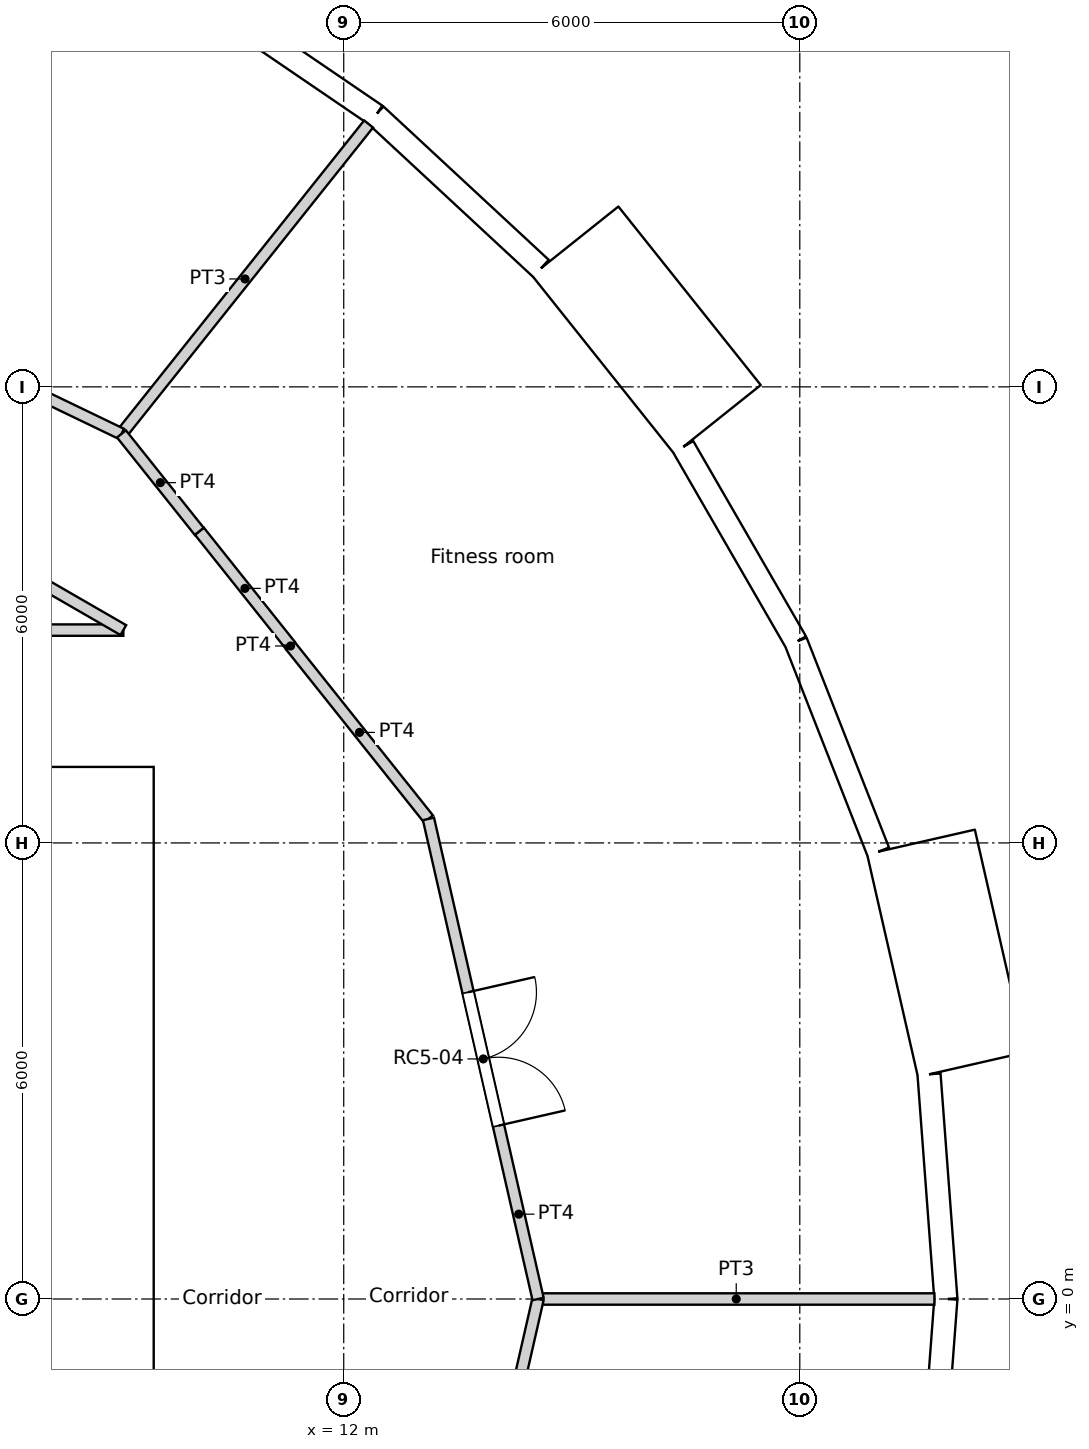
"""IFC4 building model, lengths in metres.
Left out: names, types, materials, properties, quantities, classifications, styles, units other than length and angle.
Written with IfcOpenShell. Run it as: python <this file> out.ifc"""

import sys

from ifc_helpers import new_model, si_unit, direction, frame, frame_2d, origin, origin_2d, place, context, subcontext, project, spatial, rectangle, circle, extrude, element, fill, save


model = new_model("IFC4")
c1 = context("Model", 3, precision=1e-05, world=origin(), true_north=direction((0.0, 1.0)))
c2 = subcontext(c1, "Body", "Model", "MODEL_VIEW")
j1 = project(units=[si_unit("LENGTHUNIT", "METRE"), si_unit("PLANEANGLEUNIT", "RADIAN")], contexts=[c1])
p1 = place(None, origin())
s1 = spatial("IfcSite", under=j1, at=p1, CompositionType="ELEMENT")
p2 = place(p1, origin())
s2 = spatial("IfcBuilding", under=s1, at=p2, CompositionType="ELEMENT")
p3 = place(p2, frame((0.0, 0.0, 270.6)))
s3 = spatial("IfcBuildingStorey", under=s2, at=p3, CompositionType="ELEMENT", Elevation=270.6)
for number, where, z_axis, x_axis in (
    (1, (18.822, 0.0, 0.0), (0.0, 0.0, 1.0), (1.0, 0.0, 0.0)),
    (2, (17.986, 5.548, 0.0), (0.0, 0.0, 1.0), (1.0, 0.0, 0.0)),
    (3, (15.552, 10.603, 0.0), (0.0, 0.0, 1.0), (1.0, 0.0, 0.0)),
    (4, (11.735, 14.716, 0.0), (0.0, 0.0, 1.0), (1.0, 0.0, 0.0)),
):
    element("IfcColumn", number, at=place(p3, frame(where, z_axis=z_axis, x_axis=x_axis)), inside=s3, PredefinedType="COLUMN", context=c2, shape_type="SweptSolid", body=[
        extrude(circle(Radius=0.55, at=origin_2d()), origin(), (0.0, 0.0, 1.0), 3.6),
    ])
p4 = place(p3, frame((19.922, 0.0, 0.0), z_axis=(0.0, 0.0, 1.0), x_axis=(-0.074755115547, 0.997201921729, 0.0)))
e5 = element("IfcWall", 5, at=p4, inside=s3, PredefinedType="SOLIDWALL", context=c2, shape_type="SweptSolid", body=[
    extrude(rectangle(XDim=2.962, YDim=0.3, at=frame_2d((1.481, 0.0))), origin(), (0.0, 0.0, 1.0), 3.25),
])
p5 = place(p4, frame((1.481, 0.0, 1.55)))
e6 = element("IfcOpeningElement", 6, at=p5, cuts=e5, PredefinedType="OPENING", context=c2, shape_type="SweptSolid", body=[
    extrude(circle(Radius=0.9, at=origin_2d()), frame((0.0, 0.16, 0.0), z_axis=(0.0, -1.0, 0.0), x_axis=(1.0, 0.0, 0.0)), (0.0, 0.0, 1.0), 0.32),
])
p6 = place(p3, frame((20.262, 3.086, -0.35), z_axis=(0.0, 0.0, 1.0), x_axis=(-0.222570682856, 0.974916555985, 0.0)))
e7 = element("IfcWall", 7, at=p6, inside=s3, PredefinedType="ELEMENTEDWALL", context=c2, shape_type="SweptSolid", body=[
    extrude(rectangle(XDim=3.0, YDim=1.45, at=frame_2d((1.5, 0.0))), origin(), (0.0, 0.0, 1.0), 3.6),
])
p7 = place(p6, frame((1.5, 0.0, 1.9)))
e8 = element("IfcOpeningElement", 8, at=p7, cuts=e7, PredefinedType="OPENING", context=c2, shape_type="SweptSolid", body=[
    extrude(circle(Radius=0.9, at=origin_2d()), frame((0.0, 0.735, 0.0), z_axis=(0.0, -1.0, 0.0), x_axis=(1.0, 0.0, 0.0)), (0.0, 0.0, 1.0), 1.47),
])
p8 = place(p3, frame((19.031, 5.886, 0.0), z_axis=(0.0, 0.0, 1.0), x_axis=(-0.365343821297, 0.930872650925, 0.0)))
e9 = element("IfcWall", 9, at=p8, inside=s3, PredefinedType="SOLIDWALL", context=c2, shape_type="SweptSolid", body=[
    extrude(rectangle(XDim=2.962, YDim=0.3, at=frame_2d((1.481, 0.0))), origin(), (0.0, 0.0, 1.0), 3.25),
])
p9 = place(p8, frame((1.481, 0.0, 1.55)))
e10 = element("IfcOpeningElement", 10, at=p9, cuts=e9, PredefinedType="OPENING", context=c2, shape_type="SweptSolid", body=[
    extrude(circle(Radius=0.9, at=origin_2d()), frame((0.0, 0.16, 0.0), z_axis=(0.0, -1.0, 0.0), x_axis=(1.0, 0.0, 0.0)), (0.0, 0.0, 1.0), 0.32),
])
p10 = place(p3, frame((17.949, 8.644, 0.0), z_axis=(0.0, 0.0, 1.0), x_axis=(-0.500012570604, 0.866018146021, 0.0)))
e11 = element("IfcWall", 11, at=p10, inside=s3, PredefinedType="SOLIDWALL", context=c2, shape_type="SweptSolid", body=[
    extrude(rectangle(XDim=2.962, YDim=0.3, at=frame_2d((1.481, 0.0))), origin(), (0.0, 0.0, 1.0), 3.25),
])
p11 = place(p10, frame((1.481, 0.0, 1.55)))
e12 = element("IfcOpeningElement", 12, at=p11, cuts=e11, PredefinedType="OPENING", context=c2, shape_type="SweptSolid", body=[
    extrude(circle(Radius=0.9, at=origin_2d()), frame((0.0, 0.16, 0.0), z_axis=(0.0, -1.0, 0.0), x_axis=(1.0, 0.0, 0.0)), (0.0, 0.0, 1.0), 0.32),
])
p12 = place(p3, frame((16.917, 11.572, -0.35), z_axis=(0.0, 0.0, 1.0), x_axis=(-0.623523286312, 0.781804778335, 0.0)))
e13 = element("IfcWall", 13, at=p12, inside=s3, PredefinedType="ELEMENTEDWALL", context=c2, shape_type="SweptSolid", body=[
    extrude(rectangle(XDim=3.0, YDim=1.45, at=frame_2d((1.5, 0.0))), origin(), (0.0, 0.0, 1.0), 3.6),
])
p13 = place(p12, frame((1.5, 0.0, 1.9)))
e14 = element("IfcOpeningElement", 14, at=p13, cuts=e13, PredefinedType="OPENING", context=c2, shape_type="SweptSolid", body=[
    extrude(circle(Radius=0.9, at=origin_2d()), frame((0.0, 0.735, 0.0), z_axis=(0.0, -1.0, 0.0), x_axis=(1.0, 0.0, 0.0)), (0.0, 0.0, 1.0), 1.47),
])
p14 = place(p3, frame((14.593, 13.561, 0.0), z_axis=(0.0, 0.0, 1.0), x_axis=(-0.733028283666, 0.680198158882, 0.0)))
e15 = element("IfcWall", 15, at=p14, inside=s3, PredefinedType="SOLIDWALL", context=c2, shape_type="SweptSolid", body=[
    extrude(rectangle(XDim=2.962, YDim=0.3, at=frame_2d((1.481, 0.0))), origin(), (0.0, 0.0, 1.0), 3.25),
])
p15 = place(p14, frame((1.481, 0.0, 1.55)))
e16 = element("IfcOpeningElement", 16, at=p15, cuts=e15, PredefinedType="OPENING", context=c2, shape_type="SweptSolid", body=[
    extrude(circle(Radius=0.9, at=origin_2d()), frame((0.0, 0.16, 0.0), z_axis=(0.0, -1.0, 0.0), x_axis=(1.0, 0.0, 0.0)), (0.0, 0.0, 1.0), 0.32),
])
p16 = place(p3, frame((12.421, 15.575, 0.0), z_axis=(0.0, 0.0, 1.0), x_axis=(-0.826236061068, 0.563324037646, 0.0)))
e17 = element("IfcWall", 17, at=p16, inside=s3, PredefinedType="SOLIDWALL", context=c2, shape_type="SweptSolid", body=[
    extrude(rectangle(XDim=2.962, YDim=0.3, at=frame_2d((1.481, 0.0))), origin(), (0.0, 0.0, 1.0), 3.25),
])
p17 = place(p16, frame((1.481, 0.0, 1.55)))
e18 = element("IfcOpeningElement", 18, at=p17, cuts=e17, PredefinedType="OPENING", context=c2, shape_type="SweptSolid", body=[
    extrude(circle(Radius=0.9, at=origin_2d()), frame((0.0, 0.16, 0.0), z_axis=(0.0, -1.0, 0.0), x_axis=(1.0, 0.0, 0.0)), (0.0, 0.0, 1.0), 0.32),
])
p18 = place(p3, frame((19.7, -2.954, 0.0), z_axis=(0.0, 0.0, 1.0), x_axis=(0.074755115547, 0.997201921729, 0.0)))
e19 = element("IfcWall", 19, at=p18, inside=s3, PredefinedType="SOLIDWALL", context=c2, shape_type="SweptSolid", body=[
    extrude(rectangle(XDim=2.962, YDim=0.3, at=frame_2d((1.481, 0.0))), origin(), (0.0, 0.0, 1.0), 3.25),
])
p19 = place(p18, frame((1.481, 0.0, 1.55)))
e20 = element("IfcOpeningElement", 20, at=p19, cuts=e19, PredefinedType="OPENING", context=c2, shape_type="SweptSolid", body=[
    extrude(circle(Radius=0.9, at=origin_2d()), frame((0.0, 0.16, 0.0), z_axis=(0.0, -1.0, 0.0), x_axis=(1.0, 0.0, 0.0)), (0.0, 0.0, 1.0), 0.32),
])
p20 = place(p3, frame((-9.5, 6.7, 0.0), z_axis=(0.0, 0.0, 1.0), x_axis=(1.0, 0.0, 0.0)))
e21 = element("IfcWall", 21, at=p20, inside=s3, PredefinedType="SOLIDWALL", context=c2, shape_type="SweptSolid", body=[
    extrude(rectangle(XDim=19.0, YDim=0.6, at=frame_2d((9.5, 0.0))), origin(), (0.0, 0.0, 1.0), 3.6),
])
p21 = place(p20, frame((5.35, 0.0, 0.0)))
e22 = element("IfcOpeningElement", 22, at=p21, cuts=e21, PredefinedType="OPENING", context=c2, shape_type="SweptSolid", body=[
    extrude(rectangle(XDim=1.7, YDim=2.1, at=frame_2d((0.85, 1.05))), frame((0.0, 0.3, 0.0), z_axis=(0.0, -1.0, 0.0), x_axis=(1.0, 0.0, 0.0)), (0.0, 0.0, 1.0), 0.6),
])
p22 = place(p3, frame((9.2, -6.4, 0.0), z_axis=(0.0, 0.0, 1.0), x_axis=(0.0, 1.0, 0.0)))
e23 = element("IfcWall", 23, at=p22, inside=s3, PredefinedType="SOLIDWALL", context=c2, shape_type="SweptSolid", body=[
    extrude(rectangle(XDim=12.8, YDim=0.6, at=frame_2d((6.4, 0.0))), origin(), (0.0, 0.0, 1.0), 3.6),
])
p23 = place(p22, frame((6.4, 0.0, 0.0)))
e24 = element("IfcOpeningElement", 24, at=p23, cuts=e23, PredefinedType="OPENING", context=c2, shape_type="SweptSolid", body=[
    extrude(rectangle(XDim=1.8, YDim=2.1, at=frame_2d((0.9, 1.05))), frame((0.0, 0.3, 0.0), z_axis=(0.0, -1.0, 0.0), x_axis=(1.0, 0.0, 0.0)), (0.0, 0.0, 1.0), 0.6),
])
p24 = place(p3, frame((-4.35, 3.1, 0.0), z_axis=(0.0, 0.0, 1.0), x_axis=(1.0, 0.0, 0.0)))
e25 = element("IfcWall", 25, at=p24, inside=s3, PredefinedType="SOLIDWALL", context=c2, shape_type="SweptSolid", body=[
    extrude(rectangle(XDim=13.25, YDim=0.3, at=frame_2d((6.625, 0.0))), origin(), (0.0, 0.0, 1.0), 3.25),
])
p25 = place(p24, frame((2.95, 0.0, 0.0)))
e26 = element("IfcOpeningElement", 26, at=p25, cuts=e25, PredefinedType="OPENING", context=c2, shape_type="SweptSolid", body=[
    extrude(rectangle(XDim=1.1, YDim=2.1, at=frame_2d((0.55, 1.05))), frame((0.0, 0.15, 0.0), z_axis=(0.0, -1.0, 0.0), x_axis=(1.0, 0.0, 0.0)), (0.0, 0.0, 1.0), 0.3),
])
p26 = place(p24, frame((5.75, 0.0, 0.0)))
e27 = element("IfcOpeningElement", 27, at=p26, cuts=e25, PredefinedType="OPENING", context=c2, shape_type="SweptSolid", body=[
    extrude(rectangle(XDim=1.1, YDim=2.1, at=frame_2d((0.55, 1.05))), frame((0.0, 0.15, 0.0), z_axis=(0.0, -1.0, 0.0), x_axis=(1.0, 0.0, 0.0)), (0.0, 0.0, 1.0), 0.3),
])
p27 = place(p24, frame((8.55, 0.0, 0.0)))
e28 = element("IfcOpeningElement", 28, at=p27, cuts=e25, PredefinedType="OPENING", context=c2, shape_type="SweptSolid", body=[
    extrude(rectangle(XDim=1.1, YDim=2.1, at=frame_2d((0.55, 1.05))), frame((0.0, 0.15, 0.0), z_axis=(0.0, -1.0, 0.0), x_axis=(1.0, 0.0, 0.0)), (0.0, 0.0, 1.0), 0.3),
])
p28 = place(p3, frame((-9.092, 8.8, 0.0), z_axis=(0.0, 0.0, 1.0), x_axis=(1.0, 0.0, 0.0)))
e29 = element("IfcWall", 29, at=p28, inside=s3, PredefinedType="PARTITIONING", context=c2, shape_type="SweptSolid", body=[
    extrude(rectangle(XDim=18.193, YDim=0.15, at=frame_2d((9.096, 0.0))), origin(), (0.0, 0.0, 1.0), 3.1),
])
p29 = place(p28, frame((8.592, 0.0, 0.0)))
e30 = element("IfcOpeningElement", 30, at=p29, cuts=e29, PredefinedType="OPENING", context=c2, shape_type="SweptSolid", body=[
    extrude(rectangle(XDim=1.0, YDim=2.04, at=frame_2d((0.5, 1.02))), frame((0.0, 0.075, 0.0), z_axis=(0.0, -1.0, 0.0), x_axis=(1.0, 0.0, 0.0)), (0.0, 0.0, 1.0), 0.15),
])
p30 = place(p3, frame((10.101, 10.101, 0.0), z_axis=(0.0, 0.0, 1.0), x_axis=(0.623130947784, -0.782117524362, 0.0)))
e31 = element("IfcWall", 31, at=p30, inside=s3, PredefinedType="PARTITIONING", context=c2, shape_type="SweptSolid", body=[
    extrude(rectangle(XDim=1.924, YDim=0.15, at=frame_2d((0.962, 0.0))), origin(), (0.0, 0.0, 1.0), 3.1),
])
p31 = place(p3, frame((11.3, 8.586, 0.0), z_axis=(0.0, 0.0, 1.0), x_axis=(0.0, 1.0, 0.0)))
e32 = element("IfcWall", 32, at=p31, inside=s3, PredefinedType="PARTITIONING", context=c2, shape_type="SweptSolid", body=[
    extrude(rectangle(XDim=0.01, YDim=0.15, at=frame_2d((0.005, 0.0))), origin(), (0.0, 0.0, 1.0), 3.1),
])
p32 = place(p3, frame((11.3, 8.592, 0.0), z_axis=(0.0, 0.0, 1.0), x_axis=(0.623446514299, -0.781866001185, 0.0)))
e33 = element("IfcWall", 33, at=p32, inside=s3, PredefinedType="PARTITIONING", context=c2, shape_type="SweptSolid", body=[
    extrude(rectangle(XDim=2.911, YDim=0.15, at=frame_2d((1.456, 0.0))), origin(), (0.0, 0.0, 1.0), 3.1),
])
p33 = place(p3, frame((13.115, 6.316, 0.0), z_axis=(0.0, 0.0, 1.0), x_axis=(0.222568978642, -0.97491694505, 0.0)))
e34 = element("IfcWall", 34, at=p33, inside=s3, PredefinedType="PARTITIONING", context=c2, shape_type="SweptSolid", body=[
    extrude(rectangle(XDim=6.479, YDim=0.15, at=frame_2d((3.239, 0.0))), origin(), (0.0, 0.0, 1.0), 3.1),
])
p34 = place(p33, frame((2.339, 0.0, 0.0)))
e35 = element("IfcOpeningElement", 35, at=p34, cuts=e34, PredefinedType="OPENING", context=c2, shape_type="SweptSolid", body=[
    extrude(rectangle(XDim=1.8, YDim=2.1, at=frame_2d((0.9, 1.05))), frame((0.0, 0.075, 0.0), z_axis=(0.0, -1.0, 0.0), x_axis=(1.0, 0.0, 0.0)), (0.0, 0.0, 1.0), 0.15),
])
p35 = place(p3, frame((13.115, -6.316, 0.0), z_axis=(0.0, 0.0, 1.0), x_axis=(0.222533159771, 0.974925121639, 0.0)))
e36 = element("IfcWall", 36, at=p35, inside=s3, PredefinedType="PARTITIONING", context=c2, shape_type="SweptSolid", body=[
    extrude(rectangle(XDim=6.478, YDim=0.15, at=frame_2d((3.239, 0.0))), origin(), (0.0, 0.0, 1.0), 3.1),
])
p36 = place(p35, frame((3.824, 0.0, 0.0)))
e37 = element("IfcOpeningElement", 37, at=p36, cuts=e36, PredefinedType="OPENING", context=c2, shape_type="SweptSolid", body=[
    extrude(rectangle(XDim=1.0, YDim=2.04, at=frame_2d((0.5, 1.02))), frame((0.0, 0.075, 0.0), z_axis=(0.0, -1.0, 0.0), x_axis=(1.0, 0.0, 0.0)), (0.0, 0.0, 1.0), 0.15),
])
p37 = place(p3, frame((3.261, 12.171, 0.0), z_axis=(0.0, 0.0, 1.0), x_axis=(0.866066809554, -0.499928276245, 0.0)))
e38 = element("IfcWall", 38, at=p37, inside=s3, PredefinedType="PARTITIONING", context=c2, shape_type="SweptSolid", body=[
    extrude(rectangle(XDim=6.743, YDim=0.15, at=frame_2d((3.371, 0.0))), origin(), (0.0, 0.0, 1.0), 3.1),
])
p38 = place(p3, frame((9.076, 11.381, 0.0), z_axis=(0.0, 0.0, 1.0), x_axis=(0.623805208652, -0.781579849829, 0.0)))
e39 = element("IfcWall", 39, at=p38, inside=s3, PredefinedType="PARTITIONING", context=c2, shape_type="SweptSolid", body=[
    extrude(rectangle(XDim=1.64, YDim=0.15, at=frame_2d((0.82, 0.0))), origin(), (0.0, 0.0, 1.0), 3.1),
])
p39 = place(p3, frame((3.239, 14.192, 0.0), z_axis=(0.0, 0.0, 1.0), x_axis=(0.900976027191, -0.433868872388, 0.0)))
e40 = element("IfcWall", 40, at=p39, inside=s3, PredefinedType="PARTITIONING", context=c2, shape_type="SweptSolid", body=[
    extrude(rectangle(XDim=6.479, YDim=0.15, at=frame_2d((3.239, 0.0))), origin(), (0.0, 0.0, 1.0), 3.1),
])
p40 = place(p39, frame((2.739, 0.0, 0.0)))
e41 = element("IfcOpeningElement", 41, at=p40, cuts=e40, PredefinedType="OPENING", context=c2, shape_type="SweptSolid", body=[
    extrude(rectangle(XDim=1.0, YDim=2.04, at=frame_2d((0.5, 1.02))), frame((0.0, 0.075, 0.0), z_axis=(0.0, -1.0, 0.0), x_axis=(1.0, 0.0, 0.0)), (0.0, 0.0, 1.0), 0.15),
])
p41 = place(p3, frame((9.076, 11.381, 0.0), z_axis=(0.0, 0.0, 1.0), x_axis=(0.623460949534, 0.781854490558, 0.0)))
e42 = element("IfcWall", 42, at=p41, inside=s3, PredefinedType="PARTITIONING", context=c2, shape_type="SweptSolid", body=[
    extrude(rectangle(XDim=5.214, YDim=0.15, at=frame_2d((2.607, 0.0))), origin(), (0.0, 0.0, 1.0), 3.1),
])
p42 = place(p3, frame((14.557, 0.0, 0.0), z_axis=(0.0, 0.0, 1.0), x_axis=(1.0, 0.0, 0.0)))
e43 = element("IfcWall", 43, at=p42, inside=s3, PredefinedType="PARTITIONING", context=c2, shape_type="SweptSolid", body=[
    extrude(rectangle(XDim=5.214, YDim=0.15, at=frame_2d((2.607, 0.0))), origin(), (0.0, 0.0, 1.0), 3.1),
])
p43 = place(p5, origin())
e44 = element("IfcWindow", 44, at=p43, inside=s3, PartitioningType="SINGLE_PANEL", PredefinedType="WINDOW", context=c2, shape_type="SweptSolid", body=[
    extrude(circle(Radius=0.9, at=origin_2d()), frame((0.0, 0.12, 0.0), z_axis=(0.0, -1.0, 0.0), x_axis=(1.0, 0.0, 0.0)), (0.0, 0.0, 1.0), 0.1),
])
fill(e6, e44)
p44 = place(p7, origin())
e45 = element("IfcWindow", 45, at=p44, inside=s3, PartitioningType="SINGLE_PANEL", PredefinedType="WINDOW", context=c2, shape_type="SweptSolid", body=[
    extrude(circle(Radius=0.9, at=origin_2d()), frame((0.0, 0.695, 0.0), z_axis=(0.0, -1.0, 0.0), x_axis=(1.0, 0.0, 0.0)), (0.0, 0.0, 1.0), 0.1),
])
fill(e8, e45)
p45 = place(p9, origin())
e46 = element("IfcWindow", 46, at=p45, inside=s3, PartitioningType="SINGLE_PANEL", PredefinedType="WINDOW", context=c2, shape_type="SweptSolid", body=[
    extrude(circle(Radius=0.9, at=origin_2d()), frame((0.0, 0.12, 0.0), z_axis=(0.0, -1.0, 0.0), x_axis=(1.0, 0.0, 0.0)), (0.0, 0.0, 1.0), 0.1),
])
fill(e10, e46)
p46 = place(p11, origin())
e47 = element("IfcWindow", 47, at=p46, inside=s3, PartitioningType="SINGLE_PANEL", PredefinedType="WINDOW", context=c2, shape_type="SweptSolid", body=[
    extrude(circle(Radius=0.9, at=origin_2d()), frame((0.0, 0.12, 0.0), z_axis=(0.0, -1.0, 0.0), x_axis=(1.0, 0.0, 0.0)), (0.0, 0.0, 1.0), 0.1),
])
fill(e12, e47)
p47 = place(p13, origin())
e48 = element("IfcWindow", 48, at=p47, inside=s3, PartitioningType="SINGLE_PANEL", PredefinedType="WINDOW", context=c2, shape_type="SweptSolid", body=[
    extrude(circle(Radius=0.9, at=origin_2d()), frame((0.0, 0.695, 0.0), z_axis=(0.0, -1.0, 0.0), x_axis=(1.0, 0.0, 0.0)), (0.0, 0.0, 1.0), 0.1),
])
fill(e14, e48)
p48 = place(p15, origin())
e49 = element("IfcWindow", 49, at=p48, inside=s3, PartitioningType="SINGLE_PANEL", PredefinedType="WINDOW", context=c2, shape_type="SweptSolid", body=[
    extrude(circle(Radius=0.9, at=origin_2d()), frame((0.0, 0.12, 0.0), z_axis=(0.0, -1.0, 0.0), x_axis=(1.0, 0.0, 0.0)), (0.0, 0.0, 1.0), 0.1),
])
fill(e16, e49)
p49 = place(p17, origin())
e50 = element("IfcWindow", 50, at=p49, inside=s3, PartitioningType="SINGLE_PANEL", PredefinedType="WINDOW", context=c2, shape_type="SweptSolid", body=[
    extrude(circle(Radius=0.9, at=origin_2d()), frame((0.0, 0.12, 0.0), z_axis=(0.0, -1.0, 0.0), x_axis=(1.0, 0.0, 0.0)), (0.0, 0.0, 1.0), 0.1),
])
fill(e18, e50)
p50 = place(p19, origin())
e51 = element("IfcWindow", 51, at=p50, inside=s3, PartitioningType="SINGLE_PANEL", PredefinedType="WINDOW", context=c2, shape_type="SweptSolid", body=[
    extrude(circle(Radius=0.9, at=origin_2d()), frame((0.0, 0.12, 0.0), z_axis=(0.0, -1.0, 0.0), x_axis=(1.0, 0.0, 0.0)), (0.0, 0.0, 1.0), 0.1),
])
fill(e20, e51)
p51 = place(p23, origin())
e52 = element("IfcDoor", 52, at=p51, inside=s3, OperationType="DOUBLE_DOOR_SINGLE_SWING", PredefinedType="DOOR", context=c2, shape_type="SweptSolid", body=[
    extrude(rectangle(XDim=1.8, YDim=2.1, at=frame_2d((0.9, 1.05))), frame((0.0, 0.025, 0.0), z_axis=(0.0, -1.0, 0.0), x_axis=(1.0, 0.0, 0.0)), (0.0, 0.0, 1.0), 0.05),
])
fill(e24, e52)
p52 = place(p34, origin())
e53 = element("IfcDoor", 53, at=p52, inside=s3, OperationType="DOUBLE_DOOR_SINGLE_SWING", PredefinedType="DOOR", context=c2, shape_type="SweptSolid", body=[
    extrude(rectangle(XDim=1.8, YDim=2.1, at=frame_2d((0.9, 1.05))), frame((0.0, 0.025, 0.0), z_axis=(0.0, -1.0, 0.0), x_axis=(1.0, 0.0, 0.0)), (0.0, 0.0, 1.0), 0.05),
])
fill(e35, e53)
save(model, sys.argv[1])
